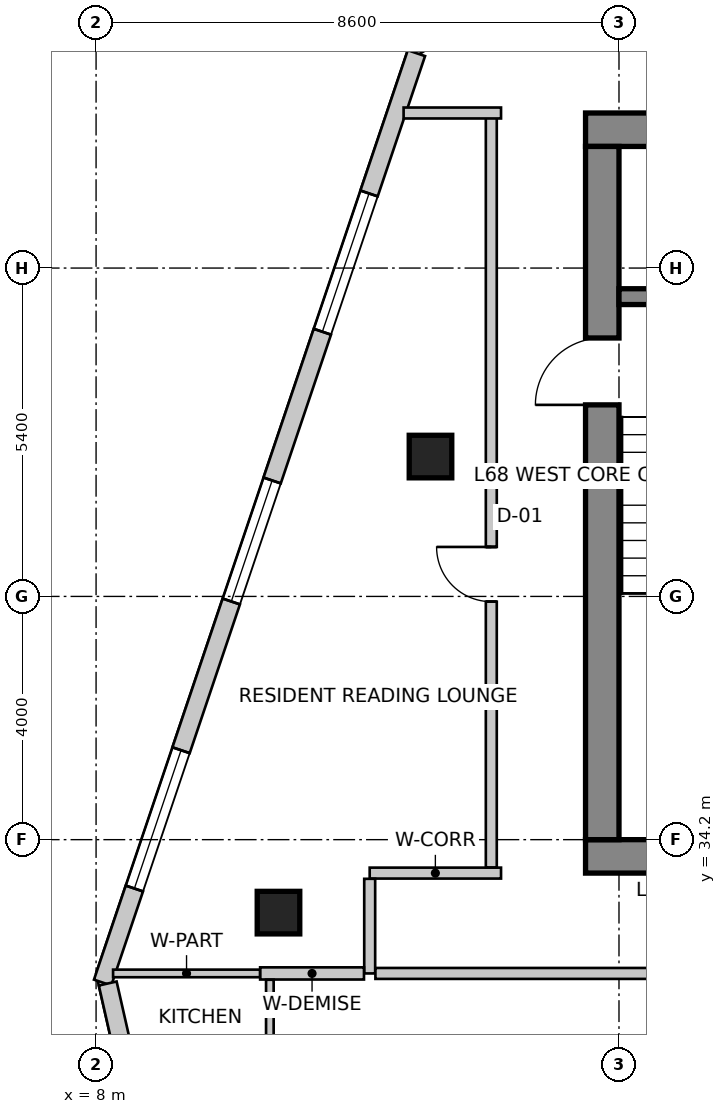
"""IFC4 building model, lengths in metres.
Left out: names, types, materials, properties, quantities, classifications, styles, units other than length and angle.
Written with IfcOpenShell. Run it as: python <this file> out.ifc"""

import sys

from ifc_helpers import new_model, si_unit, direction, frame, frame_2d, origin, origin_2d, place, context, subcontext, project, spatial, rectangle, extrude, source, transform, mapped, element, fill, save


model = new_model("IFC4")
c1 = context("Model", 3, precision=1e-05, world=origin(), true_north=direction((0.0, 1.0)))
c2 = subcontext(c1, "Body", "Model", "MODEL_VIEW")
j1 = project(units=[si_unit("LENGTHUNIT", "METRE"), si_unit("PLANEANGLEUNIT", "RADIAN")], contexts=[c1])
p1 = place(None, origin())
s1 = spatial("IfcSite", under=j1, at=p1, CompositionType="ELEMENT")
p2 = place(p1, origin())
s2 = spatial("IfcBuilding", under=s1, at=p2, CompositionType="ELEMENT")
p3 = place(p2, frame((0.0, 0.0, 267.3)))
s3 = spatial("IfcBuildingStorey", under=s2, at=p3, CompositionType="ELEMENT", Elevation=267.3)
p4 = place(p3, frame((16.05, 45.875, 0.0), z_axis=(0.0, 0.0, 1.0), x_axis=(1.0, 0.0, 0.0)))
e1 = element("IfcWall", 1, at=p4, inside=s3, PredefinedType="SHEAR", context=c2, shape_type="SweptSolid", body=[
    extrude(rectangle(XDim=15.5, YDim=0.55, at=frame_2d((7.75, 0.0))), origin(), (0.0, 0.0, 1.0), 3.6),
])
p5 = place(p3, frame((16.05, 33.925, 0.0), z_axis=(0.0, 0.0, 1.0), x_axis=(1.0, 0.0, 0.0)))
e2 = element("IfcWall", 2, at=p5, inside=s3, PredefinedType="SHEAR", context=c2, shape_type="SweptSolid", body=[
    extrude(rectangle(XDim=15.5, YDim=0.55, at=frame_2d((7.75, 0.0))), origin(), (0.0, 0.0, 1.0), 3.6),
])
m1 = source(origin(), c2, "Body", "SweptSolid", [
    extrude(rectangle(XDim=1.1, YDim=2.15, at=frame_2d((0.55, 1.075))), frame((0.0, 0.285, 0.0), z_axis=(0.0, -1.0, 0.0), x_axis=(1.0, 0.0, 0.0)), (0.0, 0.0, 1.0), 0.57),
])
p6 = place(p5, frame((9.98, 0.0, 0.0)))
e3 = element("IfcOpeningElement", 3, at=p6, cuts=e2, PredefinedType="OPENING", context=c2, shape_type="MappedRepresentation", body=[
    mapped(m1, transform((0.0, 0.0, 0.0), scale=1.0)),
])
p7 = place(p3, frame((16.325, 34.2, 0.0), z_axis=(0.0, 0.0, 1.0), x_axis=(0.0, 1.0, 0.0)))
e4 = element("IfcWall", 4, at=p7, inside=s3, PredefinedType="SHEAR", context=c2, shape_type="SweptSolid", body=[
    extrude(rectangle(XDim=11.4, YDim=0.55, at=frame_2d((5.7, 0.0))), origin(), (0.0, 0.0, 1.0), 3.6),
])
p8 = place(p7, frame((7.15, 0.0, 0.0)))
e5 = element("IfcOpeningElement", 5, at=p8, cuts=e4, PredefinedType="OPENING", context=c2, shape_type="MappedRepresentation", body=[
    mapped(m1, transform((0.0, 0.0, 0.0), scale=1.0)),
])
p9 = place(p3, frame((16.6, 43.13, 0.0), z_axis=(0.0, 0.0, 1.0), x_axis=(1.0, 0.0, 0.0)))
e6 = element("IfcWall", 6, at=p9, inside=s3, PredefinedType="SHEAR", context=c2, shape_type="SweptSolid", body=[
    extrude(rectangle(XDim=3.5, YDim=0.26, at=frame_2d((1.75, 0.0))), origin(), (0.0, 0.0, 1.0), 3.6),
])
m2 = source(origin(), c2, "Body", "SweptSolid", [
    extrude(rectangle(XDim=0.7, YDim=0.7, at=origin_2d()), origin(), (0.0, 0.0, 1.0), 3.6),
])
for number, where, z_axis, x_axis in (
    (7, (11.0, 33.0, 0.0), (0.0, 0.0, 1.0), (1.0, 0.0, 0.0)),
    (8, (13.5, 40.5, 0.0), (0.0, 0.0, 1.0), (1.0, 0.0, 0.0)),
):
    element("IfcColumn", number, at=place(p3, frame(where, z_axis=z_axis, x_axis=x_axis)), inside=s3, PredefinedType="COLUMN", context=c2, shape_type="MappedRepresentation", body=[
        mapped(m2, transform((0.0, 0.0, 0.0), scale=1.0)),
    ])
p10 = place(p3, frame((21.874, 52.742, 0.0), z_axis=(0.0, 0.0, 1.0), x_axis=(-0.84365659959, -0.536883173482, 0.0)))
e9 = element("IfcWall", 9, at=p10, inside=s3, PredefinedType="SOLIDWALL", context=c2, shape_type="SweptSolid", body=[
    extrude(rectangle(XDim=10.283, YDim=0.3, at=frame_2d((5.142, 0.0))), origin(), (0.0, 0.0, 1.0), 3.35),
])
m3 = source(origin(), c2, "Body", "SweptSolid", [
    extrude(rectangle(XDim=2.1, YDim=2.0, at=frame_2d((1.05, 1.0))), frame((0.0, 0.16, 0.0), z_axis=(0.0, -1.0, 0.0), x_axis=(1.0, 0.0, 0.0)), (0.0, 0.0, 1.0), 0.32),
])
p11 = place(p10, frame((1.41, 0.0, 0.85)))
e10 = element("IfcOpeningElement", 10, at=p11, cuts=e9, PredefinedType="OPENING", context=c2, shape_type="MappedRepresentation", body=[
    mapped(m3, transform((0.0, 0.0, 0.0), scale=1.0)),
])
m4 = source(origin(), c2, "Body", "SweptSolid", [
    extrude(rectangle(XDim=2.4, YDim=2.2, at=frame_2d((1.2, 1.1))), frame((0.0, 0.16, 0.0), z_axis=(0.0, -1.0, 0.0), x_axis=(1.0, 0.0, 0.0)), (0.0, 0.0, 1.0), 0.32),
])
p12 = place(p10, frame((5.54, 0.0, 0.85)))
e11 = element("IfcOpeningElement", 11, at=p12, cuts=e9, PredefinedType="OPENING", context=c2, shape_type="MappedRepresentation", body=[
    mapped(m4, transform((0.0, 0.0, 0.0), scale=1.0)),
])
p13 = place(p3, frame((13.269, 47.134, 0.0), z_axis=(0.0, 0.0, 1.0), x_axis=(-0.3199211297, -0.947444178182, 0.0)))
e12 = element("IfcWall", 12, at=p13, inside=s3, PredefinedType="SOLIDWALL", context=c2, shape_type="SweptSolid", body=[
    extrude(rectangle(XDim=16.132, YDim=0.3, at=frame_2d((8.066, 0.0))), origin(), (0.0, 0.0, 1.0), 3.35),
])
p14 = place(p13, frame((2.435, 0.0, 0.85)))
e13 = element("IfcOpeningElement", 13, at=p14, cuts=e12, PredefinedType="OPENING", context=c2, shape_type="MappedRepresentation", body=[
    mapped(m4, transform((0.0, 0.0, 0.0), scale=1.0)),
])
p15 = place(p13, frame((7.417, 0.0, 0.85)))
e14 = element("IfcOpeningElement", 14, at=p15, cuts=e12, PredefinedType="OPENING", context=c2, shape_type="MappedRepresentation", body=[
    mapped(m3, transform((0.0, 0.0, 0.0), scale=1.0)),
])
p16 = place(p13, frame((12.099, 0.0, 0.85)))
e15 = element("IfcOpeningElement", 15, at=p16, cuts=e12, PredefinedType="OPENING", context=c2, shape_type="MappedRepresentation", body=[
    mapped(m4, transform((0.0, 0.0, 0.0), scale=1.0)),
])
p17 = place(p3, frame((8.191, 31.834, 0.0), z_axis=(0.0, 0.0, 1.0), x_axis=(0.221636032737, -0.975129462683, 0.0)))
e16 = element("IfcWall", 16, at=p17, inside=s3, PredefinedType="SOLIDWALL", context=c2, shape_type="SweptSolid", body=[
    extrude(rectangle(XDim=10.602, YDim=0.3, at=frame_2d((5.301, 0.0))), origin(), (0.0, 0.0, 1.0), 3.35),
])
p18 = place(p17, frame((2.501, 0.0, 0.85)))
e17 = element("IfcOpeningElement", 17, at=p18, cuts=e16, PredefinedType="OPENING", context=c2, shape_type="MappedRepresentation", body=[
    mapped(m3, transform((0.0, 0.0, 0.0), scale=1.0)),
])
p19 = place(p17, frame((7.702, 0.0, 0.85)))
e18 = element("IfcOpeningElement", 18, at=p19, cuts=e16, PredefinedType="OPENING", context=c2, shape_type="MappedRepresentation", body=[
    mapped(m3, transform((0.0, 0.0, 0.0), scale=1.0)),
])
p20 = place(p3, frame((12.5, 33.65, 0.0), z_axis=(0.0, 0.0, 1.0), x_axis=(1.0, 0.0, 0.0)))
e19 = element("IfcWall", 19, at=p20, inside=s3, PredefinedType="PARTITIONING", context=c2, shape_type="SweptSolid", body=[
    extrude(rectangle(XDim=2.16, YDim=0.18, at=frame_2d((1.08, 0.0))), origin(), (0.0, 0.0, 1.0), 3.35),
])
p21 = place(p3, frame((12.5, 32.0, 0.0), z_axis=(0.0, 0.0, 1.0), x_axis=(0.0, 1.0, 0.0)))
e20 = element("IfcWall", 20, at=p21, inside=s3, PredefinedType="PARTITIONING", context=c2, shape_type="SweptSolid", body=[
    extrude(rectangle(XDim=1.556, YDim=0.18, at=frame_2d((0.778, 0.0))), origin(), (0.0, 0.0, 1.0), 3.034),
])
p22 = place(p3, frame((18.36, 32.0, 0.0), z_axis=(0.0, 0.0, 1.0), x_axis=(-1.0, 0.0, 0.0)))
e21 = element("IfcWall", 21, at=p22, inside=s3, PredefinedType="PARTITIONING", context=c2, shape_type="SweptSolid", body=[
    extrude(rectangle(XDim=5.766, YDim=0.18, at=frame_2d((2.883, 0.0))), origin(), (0.0, 0.0, 1.0), 3.034),
])
p23 = place(p3, frame((14.5, 33.744, 0.0), z_axis=(0.0, 0.0, 1.0), x_axis=(0.0, 1.0, 0.0)))
e22 = element("IfcWall", 22, at=p23, inside=s3, PredefinedType="PARTITIONING", context=c2, shape_type="SweptSolid", body=[
    extrude(rectangle(XDim=12.406, YDim=0.18, at=frame_2d((6.203, 0.0))), origin(), (0.0, 0.0, 1.0), 3.35),
])
m5 = source(origin(), c2, "Body", "SweptSolid", [
    extrude(rectangle(XDim=0.9, YDim=2.15, at=frame_2d((0.45, 1.075))), frame((0.0, 0.1, 0.0), z_axis=(0.0, -1.0, 0.0), x_axis=(1.0, 0.0, 0.0)), (0.0, 0.0, 1.0), 0.2),
])
p24 = place(p23, frame((4.37, 0.0, 0.0)))
e23 = element("IfcOpeningElement", 23, at=p24, cuts=e22, PredefinedType="OPENING", context=c2, shape_type="MappedRepresentation", body=[
    mapped(m5, transform((0.0, 0.0, 0.0), scale=1.0)),
])
p25 = place(p3, frame((14.66, 46.15, 0.0), z_axis=(0.0, 0.0, 1.0), x_axis=(-1.0, 0.0, 0.0)))
e24 = element("IfcWall", 24, at=p25, inside=s3, PredefinedType="PARTITIONING", context=c2, shape_type="SweptSolid", body=[
    extrude(rectangle(XDim=1.602, YDim=0.18, at=frame_2d((0.801, 0.0))), origin(), (0.0, 0.0, 1.0), 3.35),
])
p26 = place(p3, frame((12.406, 32.0, 0.0), z_axis=(0.0, 0.0, 1.0), x_axis=(-1.0, 0.0, 0.0)))
e25 = element("IfcWall", 25, at=p26, inside=s3, PredefinedType="PARTITIONING", context=c2, shape_type="SweptSolid", body=[
    extrude(rectangle(XDim=1.708, YDim=0.2, at=frame_2d((0.854, 0.0))), origin(), (0.0, 0.0, 1.0), 2.642),
])
p27 = place(p3, frame((10.696, 32.0, 0.0), z_axis=(0.0, 0.0, 1.0), x_axis=(-1.0, 0.0, 0.0)))
e26 = element("IfcWall", 26, at=p27, inside=s3, PredefinedType="PARTITIONING", context=c2, shape_type="SweptSolid", body=[
    extrude(rectangle(XDim=2.416, YDim=0.125, at=frame_2d((1.208, 0.0))), origin(), (0.0, 0.0, 1.0), 3.35),
])
p28 = place(p3, frame((10.858, 25.032, 0.0), z_axis=(0.0, 0.0, 1.0), x_axis=(0.0, 1.0, 0.0)))
e27 = element("IfcWall", 27, at=p28, inside=s3, PredefinedType="PARTITIONING", context=c2, shape_type="SweptSolid", body=[
    extrude(rectangle(XDim=6.864, YDim=0.125, at=frame_2d((3.432, 0.0))), origin(), (0.0, 0.0, 1.0), 2.642),
])
m6 = source(origin(), c2, "Body", "SweptSolid", [
    extrude(rectangle(XDim=0.85, YDim=2.15, at=frame_2d((0.425, 1.075))), frame((0.0, 0.073, 0.0), z_axis=(0.0, -1.0, 0.0), x_axis=(1.0, 0.0, 0.0)), (0.0, 0.0, 1.0), 0.145),
])
p29 = place(p28, frame((0.886, 0.0, 0.0)))
e28 = element("IfcOpeningElement", 28, at=p29, cuts=e27, PredefinedType="OPENING", context=c2, shape_type="MappedRepresentation", body=[
    mapped(m6, transform((0.0, 0.0, 0.0), scale=1.0)),
])
m7 = source(origin(), c2, "Body", "SweptSolid", [
    extrude(rectangle(XDim=2.4, YDim=2.2, at=frame_2d((1.2, 1.1))), frame((0.0, -0.015, 0.0), z_axis=(0.0, -1.0, 0.0), x_axis=(1.0, 0.0, 0.0)), (0.0, 0.0, 1.0), 0.06),
])
p30 = place(p14, origin())
e29 = element("IfcWindow", 29, at=p30, inside=s3, PartitioningType="SINGLE_PANEL", PredefinedType="WINDOW", context=c2, shape_type="MappedRepresentation", body=[
    mapped(m7, transform((0.0, 0.0, 0.0), scale=1.0)),
])
fill(e13, e29)
m8 = source(origin(), c2, "Body", "SweptSolid", [
    extrude(rectangle(XDim=2.1, YDim=2.0, at=frame_2d((1.05, 1.0))), frame((0.0, -0.015, 0.0), z_axis=(0.0, -1.0, 0.0), x_axis=(1.0, 0.0, 0.0)), (0.0, 0.0, 1.0), 0.06),
])
p31 = place(p15, origin())
e30 = element("IfcWindow", 30, at=p31, inside=s3, PartitioningType="SINGLE_PANEL", PredefinedType="WINDOW", context=c2, shape_type="MappedRepresentation", body=[
    mapped(m8, transform((0.0, 0.0, 0.0), scale=1.0)),
])
fill(e14, e30)
p32 = place(p16, origin())
e31 = element("IfcWindow", 31, at=p32, inside=s3, PartitioningType="SINGLE_PANEL", PredefinedType="WINDOW", context=c2, shape_type="MappedRepresentation", body=[
    mapped(m7, transform((0.0, 0.0, 0.0), scale=1.0)),
])
fill(e15, e31)
m9 = source(origin(), c2, "Body", "SweptSolid", [
    extrude(rectangle(XDim=1.1, YDim=2.15, at=frame_2d((0.55, 1.075))), frame((0.0, 0.025, 0.0), z_axis=(0.0, -1.0, 0.0), x_axis=(1.0, 0.0, 0.0)), (0.0, 0.0, 1.0), 0.05),
])
p33 = place(p8, origin())
e32 = element("IfcDoor", 32, at=p33, inside=s3, OperationType="SINGLE_SWING_LEFT", PredefinedType="DOOR", context=c2, shape_type="MappedRepresentation", body=[
    mapped(m9, transform((0.0, 0.0, 0.0), scale=1.0)),
])
fill(e5, e32)
m10 = source(origin(), c2, "Body", "SweptSolid", [
    extrude(rectangle(XDim=0.9, YDim=2.15, at=frame_2d((0.45, 1.075))), frame((0.0, 0.025, 0.0), z_axis=(0.0, -1.0, 0.0), x_axis=(1.0, 0.0, 0.0)), (0.0, 0.0, 1.0), 0.05),
])
p34 = place(p24, origin())
e33 = element("IfcDoor", 33, at=p34, inside=s3, OperationType="SINGLE_SWING_RIGHT", PredefinedType="DOOR", context=c2, shape_type="MappedRepresentation", body=[
    mapped(m10, transform((0.0, 0.0, 0.0), scale=1.0)),
])
fill(e23, e33)
save(model, sys.argv[1])
